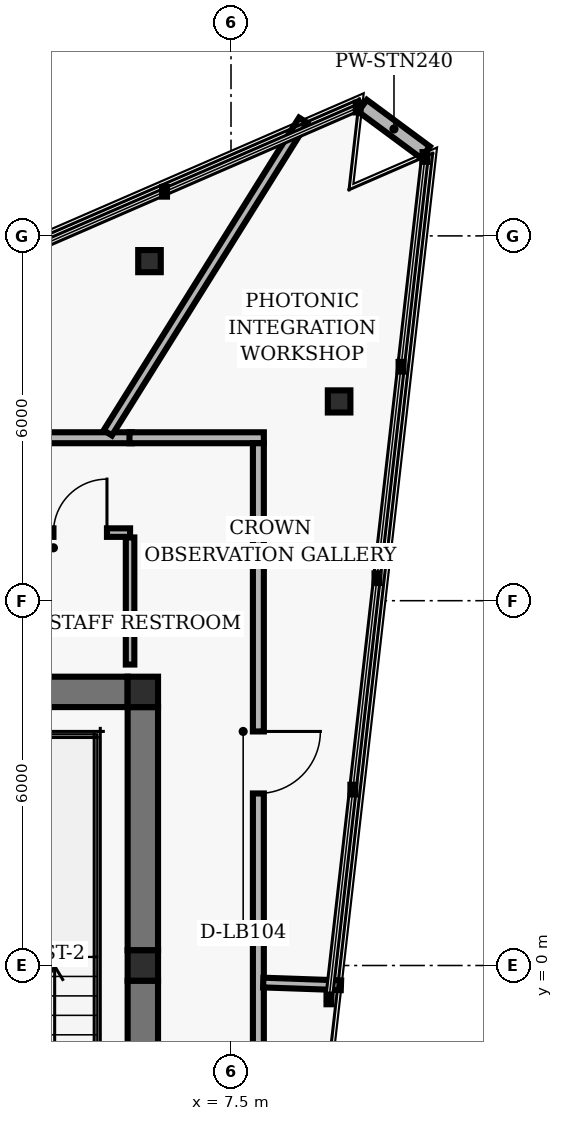
"""IFC4 building model, lengths in metres.
Left out: names, types, materials, properties, quantities, classifications, styles, units other than length and angle.
Written with IfcOpenShell. Run it as: python <this file> out.ifc"""

import sys

from ifc_helpers import new_model, si_unit, direction, frame, frame_2d, origin, origin_2d, place, context, subcontext, project, spatial, rectangle, hollow_rectangle, i_section, extrude, element, fill, save


model = new_model("IFC4")
c1 = context("Model", 3, precision=1e-05, world=origin(), true_north=direction((0.0, 1.0)))
c2 = subcontext(c1, "Body", "Model", "MODEL_VIEW")
j1 = project(units=[si_unit("LENGTHUNIT", "METRE"), si_unit("PLANEANGLEUNIT", "RADIAN")], contexts=[c1])
p1 = place(None, origin())
s1 = spatial("IfcSite", under=j1, at=p1, CompositionType="ELEMENT")
p2 = place(p1, origin())
s2 = spatial("IfcBuilding", under=s1, at=p2, CompositionType="ELEMENT")
p3 = place(p2, frame((0.0, 0.0, 252.0)))
s3 = spatial("IfcBuildingStorey", under=s2, at=p3, CompositionType="ELEMENT", Elevation=252.0)
for number, where, z_axis, x_axis in (
    (1, (6.05, 4.5, 0.0), (0.0, 0.0, 1.0), (1.0, 0.0, 0.0)),
    (2, (6.05, 0.0, 0.0), (0.0, 0.0, 1.0), (1.0, 0.0, 0.0)),
):
    element("IfcColumn", number, at=place(p3, frame(where, z_axis=z_axis, x_axis=x_axis)), inside=s3, PredefinedType="COLUMN", context=c2, shape_type="SweptSolid", body=[
        extrude(hollow_rectangle(XDim=0.5, YDim=0.5, WallThickness=0.02, InnerFilletRadius=0.02, OuterFilletRadius=0.04, at=origin_2d()), origin(), (0.0, 0.0, 1.0), 2.88),
    ])
p4 = place(p3, frame((6.05, 0.25, 0.0), z_axis=(0.0, 0.0, 1.0), x_axis=(0.0, 1.0, 0.0)))
e3 = element("IfcWall", 3, at=p4, inside=s3, PredefinedType="SHEAR", context=c2, shape_type="SweptSolid", body=[
    extrude(rectangle(XDim=4.0, YDim=0.5, at=frame_2d((2.0, 0.0))), origin(), (0.0, 0.0, 1.0), 2.648),
])
p5 = place(p3, frame((6.05, -4.05, 0.0), z_axis=(0.0, 0.0, 1.0), x_axis=(0.0, 1.0, 0.0)))
e4 = element("IfcWall", 4, at=p5, inside=s3, PredefinedType="SHEAR", context=c2, shape_type="SweptSolid", body=[
    extrude(rectangle(XDim=3.8, YDim=0.5, at=frame_2d((1.9, 0.0))), origin(), (0.0, 0.0, 1.0), 2.648),
])
p6 = place(p3, frame((2.05, 4.5, 0.0), z_axis=(0.0, 0.0, 1.0), x_axis=(1.0, 0.0, 0.0)))
e5 = element("IfcWall", 5, at=p6, inside=s3, PredefinedType="SHEAR", context=c2, shape_type="SweptSolid", body=[
    extrude(rectangle(XDim=3.75, YDim=0.5, at=frame_2d((1.875, 0.0))), origin(), (0.0, 0.0, 1.0), 2.648),
])
for number, where, z_axis, x_axis in (
    (6, (9.278, 9.277, 0.0), (0.0, 0.0, 1.0), (1.0, 0.0, 0.0)),
    (7, (6.159, 11.585, 0.0), (0.0, 0.0, 1.0), (1.0, 0.0, 0.0)),
):
    element("IfcColumn", number, at=place(p3, frame(where, z_axis=z_axis, x_axis=x_axis)), inside=s3, PredefinedType="COLUMN", context=c2, shape_type="SweptSolid", body=[
        extrude(i_section(OverallWidth=0.371, OverallDepth=0.364, WebThickness=0.013, FlangeThickness=0.022, FilletRadius=0.015, at=origin_2d()), origin(), (0.0, 0.0, 1.0), 2.88),
    ])
p7 = place(p3, frame((10.698, 13.375, 0.0), z_axis=(0.0, 0.0, 1.0), x_axis=(-0.803939758325, 0.5947107406, 0.0)))
e8 = element("IfcWall", 8, at=p7, inside=s3, PredefinedType="PARAPET", context=c2, shape_type="SweptSolid", body=[
    extrude(rectangle(XDim=1.288, YDim=0.24, at=frame_2d((0.644, 0.0))), origin(), (0.0, 0.0, 1.0), 2.168),
])
p8 = place(p3, frame((5.84, 4.95, 0.0), z_axis=(0.0, 0.0, 1.0), x_axis=(0.0, 1.0, 0.0)))
e9 = element("IfcWall", 9, at=p8, inside=s3, PredefinedType="PARTITIONING", context=c2, shape_type="SweptSolid", body=[
    extrude(rectangle(XDim=2.09, YDim=0.14, at=frame_2d((1.045, 0.0))), origin(), (0.0, 0.0, 1.0), 2.153),
])
p9 = place(p3, frame((1.98, 7.12, 0.0), z_axis=(0.0, 0.0, 1.0), x_axis=(1.0, 0.0, 0.0)))
e10 = element("IfcWall", 10, at=p9, inside=s3, PredefinedType="PARTITIONING", context=c2, shape_type="SweptSolid", body=[
    extrude(rectangle(XDim=3.86, YDim=0.14, at=frame_2d((1.93, 0.0))), origin(), (0.0, 0.0, 1.0), 2.623),
])
p10 = place(p9, frame((0.72, 0.0, 0.0)))
e11 = element("IfcOpeningElement", 11, at=p10, cuts=e10, PredefinedType="OPENING", context=c2, shape_type="SweptSolid", body=[
    extrude(rectangle(XDim=0.88, YDim=2.02, at=frame_2d((0.44, 1.01))), frame((0.0, 0.08, 0.0), z_axis=(0.0, -1.0, 0.0), x_axis=(1.0, 0.0, 0.0)), (0.0, 0.0, 1.0), 0.16),
])
p11 = place(p9, frame((2.6, 0.0, 0.0)))
e12 = element("IfcOpeningElement", 12, at=p11, cuts=e10, PredefinedType="OPENING", context=c2, shape_type="SweptSolid", body=[
    extrude(rectangle(XDim=0.88, YDim=2.02, at=frame_2d((0.44, 1.01))), frame((0.0, 0.08, 0.0), z_axis=(0.0, -1.0, 0.0), x_axis=(1.0, 0.0, 0.0)), (0.0, 0.0, 1.0), 0.16),
])
p12 = place(p3, frame((-0.61, 8.68, 0.0), z_axis=(0.0, 0.0, 1.0), x_axis=(1.0, 0.0, 0.0)))
e13 = element("IfcWall", 13, at=p12, inside=s3, PredefinedType="PARTITIONING", context=c2, shape_type="SweptSolid", body=[
    extrude(rectangle(XDim=6.48, YDim=0.18, at=frame_2d((3.24, 0.0))), origin(), (0.0, 0.0, 1.0), 2.623),
])
p13 = place(p12, frame((2.666, 0.0, 0.0)))
e14 = element("IfcOpeningElement", 14, at=p13, cuts=e13, PredefinedType="OPENING", context=c2, shape_type="SweptSolid", body=[
    extrude(rectangle(XDim=1.02, YDim=2.02, at=frame_2d((0.51, 1.01))), frame((0.0, 0.1, 0.0), z_axis=(0.0, -1.0, 0.0), x_axis=(1.0, 0.0, 0.0)), (0.0, 0.0, 1.0), 0.2),
])
p14 = place(p3, frame((5.83, 8.68, 0.0), z_axis=(0.0, 0.0, 1.0), x_axis=(1.0, 0.0, 0.0)))
e15 = element("IfcWall", 15, at=p14, inside=s3, PredefinedType="PARTITIONING", context=c2, shape_type="SweptSolid", body=[
    extrude(rectangle(XDim=2.21, YDim=0.18, at=frame_2d((1.105, 0.0))), origin(), (0.0, 0.0, 1.0), 2.623),
])
p15 = place(p3, frame((7.95, 8.59, 0.0), z_axis=(0.0, 0.0, 1.0), x_axis=(0.0, -1.0, 0.0)))
e16 = element("IfcWall", 16, at=p15, inside=s3, PredefinedType="PARTITIONING", context=c2, shape_type="SweptSolid", body=[
    extrude(rectangle(XDim=1.41, YDim=0.18, at=frame_2d((0.705, 0.0))), origin(), (0.0, 0.0, 1.0), 2.623),
])
p16 = place(p3, frame((7.95, 7.22, 0.0), z_axis=(0.0, 0.0, 1.0), x_axis=(0.0, -1.0, 0.0)))
e17 = element("IfcWall", 17, at=p16, inside=s3, PredefinedType="PARTITIONING", context=c2, shape_type="SweptSolid", body=[
    extrude(rectangle(XDim=9.859, YDim=0.18, at=frame_2d((4.929, 0.0))), origin(), (0.0, 0.0, 1.0), 2.203),
])
p17 = place(p16, frame((3.371, 0.0, 0.0)))
e18 = element("IfcOpeningElement", 18, at=p17, cuts=e17, PredefinedType="OPENING", context=c2, shape_type="SweptSolid", body=[
    extrude(rectangle(XDim=1.02, YDim=2.02, at=frame_2d((0.51, 1.01))), frame((0.0, 0.1, 0.0), z_axis=(0.0, -1.0, 0.0), x_axis=(1.0, 0.0, 0.0)), (0.0, 0.0, 1.0), 0.2),
])
p18 = place(p3, frame((8.03, -0.281, 0.0), z_axis=(0.0, 0.0, 1.0), x_axis=(0.999389795714, -0.034929016924, 0.0)))
e19 = element("IfcWall", 19, at=p18, inside=s3, PredefinedType="PARTITIONING", context=c2, shape_type="SweptSolid", body=[
    extrude(rectangle(XDim=1.279, YDim=0.16, at=frame_2d((0.64, 0.0))), origin(), (0.0, 0.0, 1.0), 2.623),
])
p19 = place(p3, frame((5.474, 8.76, 0.0), z_axis=(0.0, 0.0, 1.0), x_axis=(0.529930175969, 0.84804127765, 0.0)))
e20 = element("IfcWall", 20, at=p19, inside=s3, PredefinedType="PARTITIONING", context=c2, shape_type="SweptSolid", body=[
    extrude(rectangle(XDim=6.064, YDim=0.16, at=frame_2d((3.032, 0.0))), origin(), (0.0, 0.0, 1.0), 2.623),
])
p20 = place(p11, origin())
e21 = element("IfcDoor", 21, at=p20, inside=s3, OperationType="SINGLE_SWING_RIGHT", PredefinedType="DOOR", context=c2, shape_type="SweptSolid", body=[
    extrude(rectangle(XDim=0.88, YDim=2.02, at=frame_2d((0.44, 1.01))), frame((0.0, 0.025, 0.0), z_axis=(0.0, -1.0, 0.0), x_axis=(1.0, 0.0, 0.0)), (0.0, 0.0, 1.0), 0.05),
])
fill(e12, e21)
p21 = place(p17, origin())
e22 = element("IfcDoor", 22, at=p21, inside=s3, OperationType="SINGLE_SWING_LEFT", PredefinedType="DOOR", context=c2, shape_type="SweptSolid", body=[
    extrude(rectangle(XDim=1.02, YDim=2.02, at=frame_2d((0.51, 1.01))), frame((0.0, 0.025, 0.0), z_axis=(0.0, -1.0, 0.0), x_axis=(1.0, 0.0, 0.0)), (0.0, 0.0, 1.0), 0.05),
])
fill(e18, e22)
save(model, sys.argv[1])
